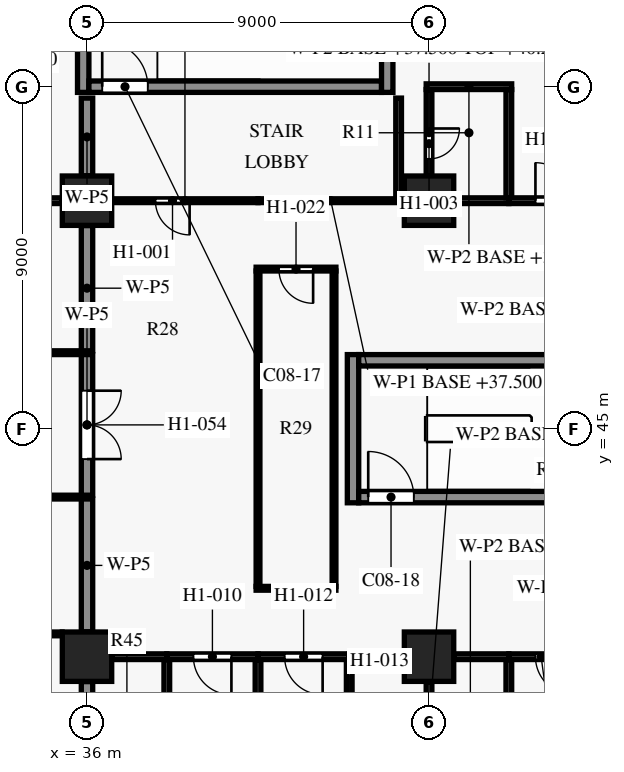
"""IFC4 building model, lengths in metres.
Left out: names, types, materials, properties, quantities, classifications, styles, units other than length and angle.
Written with IfcOpenShell. Run it as: python <this file> out.ifc"""

import sys

from ifc_helpers import new_model, si_unit, direction, frame, frame_2d, origin, origin_2d, place, context, subcontext, project, spatial, rectangle, extrude, element, fill, save


model = new_model("IFC4")
c1 = context("Model", 3, precision=1e-05, world=origin(), true_north=direction((0.0, 1.0)))
c2 = subcontext(c1, "Body", "Model", "MODEL_VIEW")
j1 = project(units=[si_unit("LENGTHUNIT", "METRE"), si_unit("PLANEANGLEUNIT", "RADIAN")], contexts=[c1])
p1 = place(None, origin())
s1 = spatial("IfcSite", under=j1, at=p1, CompositionType="ELEMENT")
p2 = place(p1, origin())
s2 = spatial("IfcBuilding", under=s1, at=p2, CompositionType="ELEMENT")
p3 = place(p2, frame((0.0, 0.0, 37.5)))
s3 = spatial("IfcBuildingStorey", under=s2, at=p3, CompositionType="ELEMENT", Elevation=37.5)
for number, where, z_axis, x_axis in (
    (1, (36.0, 39.0, 0.0), (0.0, 0.0, 1.0), (1.0, 0.0, 0.0)),
    (2, (36.0, 51.0, 0.0), (0.0, 0.0, 1.0), (1.0, 0.0, 0.0)),
    (3, (45.0, 39.0, 0.0), (0.0, 0.0, 1.0), (1.0, 0.0, 0.0)),
    (4, (45.0, 51.0, 0.0), (0.0, 0.0, 1.0), (1.0, 0.0, 0.0)),
):
    element("IfcColumn", number, at=place(p3, frame(where, z_axis=z_axis, x_axis=x_axis)), inside=s3, PredefinedType="COLUMN", context=c2, shape_type="SweptSolid", body=[
        extrude(rectangle(XDim=1.3, YDim=1.3, at=origin_2d()), origin(), (0.0, 0.0, 1.0), 3.6),
    ])
p4 = place(p3, frame((43.15, 43.2, 0.0), z_axis=(0.0, 0.0, 1.0), x_axis=(1.0, 0.0, 0.0)))
e5 = element("IfcWall", 5, at=p4, inside=s3, PredefinedType="SHEAR", context=c2, shape_type="SweptSolid", body=[
    extrude(rectangle(XDim=7.7, YDim=0.3, at=frame_2d((3.85, 0.0))), origin(), (0.0, 0.0, 1.0), 3.3),
])
p5 = place(p4, frame((0.25, 0.0, 0.0)))
e6 = element("IfcOpeningElement", 6, at=p5, cuts=e5, PredefinedType="OPENING", context=c2, shape_type="SweptSolid", body=[
    extrude(rectangle(XDim=1.2, YDim=2.2, at=frame_2d((0.6, 1.1))), frame((0.0, 0.16, 0.0), z_axis=(0.0, -1.0, 0.0), x_axis=(1.0, 0.0, 0.0)), (0.0, 0.0, 1.0), 0.32),
])
p6 = place(p3, frame((43.15, 46.8, 0.0), z_axis=(0.0, 0.0, 1.0), x_axis=(1.0, 0.0, 0.0)))
e7 = element("IfcWall", 7, at=p6, inside=s3, PredefinedType="SHEAR", context=c2, shape_type="SweptSolid", body=[
    extrude(rectangle(XDim=7.7, YDim=0.3, at=frame_2d((3.85, 0.0))), origin(), (0.0, 0.0, 1.0), 3.3),
])
p7 = place(p3, frame((36.05, 54.0, 0.0), z_axis=(0.0, 0.0, 1.0), x_axis=(1.0, 0.0, 0.0)))
e8 = element("IfcWall", 8, at=p7, inside=s3, PredefinedType="SHEAR", context=c2, shape_type="SweptSolid", body=[
    extrude(rectangle(XDim=7.7, YDim=0.3, at=frame_2d((3.85, 0.0))), origin(), (0.0, 0.0, 1.0), 3.3),
])
p8 = place(p7, frame((0.35, 0.0, 0.0)))
e9 = element("IfcOpeningElement", 9, at=p8, cuts=e8, PredefinedType="OPENING", context=c2, shape_type="SweptSolid", body=[
    extrude(rectangle(XDim=1.2, YDim=2.2, at=frame_2d((0.6, 1.1))), frame((0.0, 0.16, 0.0), z_axis=(0.0, -1.0, 0.0), x_axis=(1.0, 0.0, 0.0)), (0.0, 0.0, 1.0), 0.32),
])
for number, where, z_axis, x_axis in (
    (10, (35.9, 53.85, 0.0), (0.0, 0.0, 1.0), (0.0, 1.0, 0.0)),
    (11, (43.0, 43.05, 0.0), (0.0, 0.0, 1.0), (0.0, 1.0, 0.0)),
    (12, (43.9, 53.85, 0.0), (0.0, 0.0, 1.0), (0.0, 1.0, 0.0)),
):
    element("IfcWall", number, at=place(p3, frame(where, z_axis=z_axis, x_axis=x_axis)), inside=s3, PredefinedType="SHEAR", context=c2, shape_type="SweptSolid", body=[
        extrude(rectangle(XDim=3.9, YDim=0.3, at=frame_2d((1.95, 0.0))), origin(), (0.0, 0.0, 1.0), 3.3),
    ])
p9 = place(p3, frame((38.1, 36.075, 0.0), z_axis=(0.0, 0.0, 1.0), x_axis=(0.0, 1.0, 0.0)))
e13 = element("IfcWall", 13, at=p9, inside=s3, PredefinedType="PARTITIONING", context=c2, shape_type="SweptSolid", body=[
    extrude(rectangle(XDim=2.85, YDim=0.15, at=frame_2d((1.425, 0.0))), origin(), (0.0, 0.0, 1.0), 2.58),
])
p10 = place(p9, frame((1.025, 0.0, 0.0)))
e14 = element("IfcOpeningElement", 14, at=p10, cuts=e13, PredefinedType="OPENING", context=c2, shape_type="SweptSolid", body=[
    extrude(rectangle(XDim=0.8, YDim=2.1, at=frame_2d((0.4, 1.05))), frame((0.0, 0.085, 0.0), z_axis=(0.0, -1.0, 0.0), x_axis=(1.0, 0.0, 0.0)), (0.0, 0.0, 1.0), 0.17),
])
p11 = place(p3, frame((47.1, 36.075, 0.0), z_axis=(0.0, 0.0, 1.0), x_axis=(0.0, 1.0, 0.0)))
e15 = element("IfcWall", 15, at=p11, inside=s3, PredefinedType="PARTITIONING", context=c2, shape_type="SweptSolid", body=[
    extrude(rectangle(XDim=2.85, YDim=0.15, at=frame_2d((1.425, 0.0))), origin(), (0.0, 0.0, 1.0), 2.58),
])
p12 = place(p11, frame((1.025, 0.0, 0.0)))
e16 = element("IfcOpeningElement", 16, at=p12, cuts=e15, PredefinedType="OPENING", context=c2, shape_type="SweptSolid", body=[
    extrude(rectangle(XDim=0.8, YDim=2.1, at=frame_2d((0.4, 1.05))), frame((0.0, 0.085, 0.0), z_axis=(0.0, -1.0, 0.0), x_axis=(1.0, 0.0, 0.0)), (0.0, 0.0, 1.0), 0.17),
])
p13 = place(p3, frame((36.0, 38.345, 0.0), z_axis=(0.0, 0.0, 1.0), x_axis=(0.0, -1.0, 0.0)))
e17 = element("IfcWall", 17, at=p13, inside=s3, PredefinedType="PARTITIONING", context=c2, shape_type="SweptSolid", body=[
    extrude(rectangle(XDim=2.27, YDim=0.3, at=frame_2d((1.135, 0.0))), origin(), (0.0, 0.0, 1.0), 2.58),
])
p14 = place(p3, frame((45.0, 38.345, 0.0), z_axis=(0.0, 0.0, 1.0), x_axis=(0.0, -1.0, 0.0)))
e18 = element("IfcWall", 18, at=p14, inside=s3, PredefinedType="PARTITIONING", context=c2, shape_type="SweptSolid", body=[
    extrude(rectangle(XDim=2.27, YDim=0.15, at=frame_2d((1.135, 0.0))), origin(), (0.0, 0.0, 1.0), 2.73),
])
p15 = place(p3, frame((40.5, 38.925, 0.0), z_axis=(0.0, 0.0, 1.0), x_axis=(0.0, -1.0, 0.0)))
e19 = element("IfcWall", 19, at=p15, inside=s3, PredefinedType="PARTITIONING", context=c2, shape_type="SweptSolid", body=[
    extrude(rectangle(XDim=11.35, YDim=0.15, at=frame_2d((5.675, 0.0))), origin(), (0.0, 0.0, 1.0), 2.58),
])
p16 = place(p3, frame((42.9, 38.925, 0.0), z_axis=(0.0, 0.0, 1.0), x_axis=(0.0, -1.0, 0.0)))
e20 = element("IfcWall", 20, at=p16, inside=s3, PredefinedType="PARTITIONING", context=c2, shape_type="SweptSolid", body=[
    extrude(rectangle(XDim=2.85, YDim=0.15, at=frame_2d((1.425, 0.0))), origin(), (0.0, 0.0, 1.0), 2.58),
])
p17 = place(p16, frame((1.025, 0.0, 0.0)))
e21 = element("IfcOpeningElement", 21, at=p17, cuts=e20, PredefinedType="OPENING", context=c2, shape_type="SweptSolid", body=[
    extrude(rectangle(XDim=0.8, YDim=2.1, at=frame_2d((0.4, 1.05))), frame((0.0, 0.085, 0.0), z_axis=(0.0, -1.0, 0.0), x_axis=(1.0, 0.0, 0.0)), (0.0, 0.0, 1.0), 0.17),
])
p18 = place(p3, frame((38.1, 39.0, 0.0), z_axis=(0.0, 0.0, 1.0), x_axis=(-1.0, 0.0, 0.0)))
e22 = element("IfcWall", 22, at=p18, inside=s3, PredefinedType="PARTITIONING", context=c2, shape_type="SweptSolid", body=[
    extrude(rectangle(XDim=1.445, YDim=0.15, at=frame_2d((0.723, 0.0))), origin(), (0.0, 0.0, 1.0), 2.58),
])
p19 = place(p3, frame((40.5, 39.0, 0.0), z_axis=(0.0, 0.0, 1.0), x_axis=(-1.0, 0.0, 0.0)))
e23 = element("IfcWall", 23, at=p19, inside=s3, PredefinedType="PARTITIONING", context=c2, shape_type="SweptSolid", body=[
    extrude(rectangle(XDim=2.4, YDim=0.15, at=frame_2d((1.2, 0.0))), origin(), (0.0, 0.0, 1.0), 2.58),
])
p20 = place(p19, frame((0.7, 0.0, 0.0)))
e24 = element("IfcOpeningElement", 24, at=p20, cuts=e23, PredefinedType="OPENING", context=c2, shape_type="SweptSolid", body=[
    extrude(rectangle(XDim=1.0, YDim=2.1, at=frame_2d((0.5, 1.05))), frame((0.0, 0.085, 0.0), z_axis=(0.0, -1.0, 0.0), x_axis=(1.0, 0.0, 0.0)), (0.0, 0.0, 1.0), 0.17),
])
p21 = place(p3, frame((42.9, 39.0, 0.0), z_axis=(0.0, 0.0, 1.0), x_axis=(-1.0, 0.0, 0.0)))
e25 = element("IfcWall", 25, at=p21, inside=s3, PredefinedType="PARTITIONING", context=c2, shape_type="SweptSolid", body=[
    extrude(rectangle(XDim=2.4, YDim=0.15, at=frame_2d((1.2, 0.0))), origin(), (0.0, 0.0, 1.0), 2.58),
])
p22 = place(p21, frame((0.7, 0.0, 0.0)))
e26 = element("IfcOpeningElement", 26, at=p22, cuts=e25, PredefinedType="OPENING", context=c2, shape_type="SweptSolid", body=[
    extrude(rectangle(XDim=1.0, YDim=2.1, at=frame_2d((0.5, 1.05))), frame((0.0, 0.085, 0.0), z_axis=(0.0, -1.0, 0.0), x_axis=(1.0, 0.0, 0.0)), (0.0, 0.0, 1.0), 0.17),
])
for number, where, z_axis, x_axis in (
    (27, (44.345, 39.0, 0.0), (0.0, 0.0, 1.0), (-1.0, 0.0, 0.0)),
    (28, (47.1, 39.0, 0.0), (0.0, 0.0, 1.0), (-1.0, 0.0, 0.0)),
):
    element("IfcWall", number, at=place(p3, frame(where, z_axis=z_axis, x_axis=x_axis)), inside=s3, PredefinedType="PARTITIONING", context=c2, shape_type="SweptSolid", body=[
        extrude(rectangle(XDim=1.445, YDim=0.15, at=frame_2d((0.723, 0.0))), origin(), (0.0, 0.0, 1.0), 2.58),
    ])
p23 = place(p3, frame((49.5, 39.0, 0.0), z_axis=(0.0, 0.0, 1.0), x_axis=(-1.0, 0.0, 0.0)))
e29 = element("IfcWall", 29, at=p23, inside=s3, PredefinedType="PARTITIONING", context=c2, shape_type="SweptSolid", body=[
    extrude(rectangle(XDim=2.4, YDim=0.15, at=frame_2d((1.2, 0.0))), origin(), (0.0, 0.0, 1.0), 2.58),
])
p24 = place(p23, frame((0.7, 0.0, 0.0)))
e30 = element("IfcOpeningElement", 30, at=p24, cuts=e29, PredefinedType="OPENING", context=c2, shape_type="SweptSolid", body=[
    extrude(rectangle(XDim=1.0, YDim=2.1, at=frame_2d((0.5, 1.05))), frame((0.0, 0.085, 0.0), z_axis=(0.0, -1.0, 0.0), x_axis=(1.0, 0.0, 0.0)), (0.0, 0.0, 1.0), 0.17),
])
p25 = place(p3, frame((35.345, 39.6, 0.0), z_axis=(0.0, 0.0, 1.0), x_axis=(-1.0, 0.0, 0.0)))
e31 = element("IfcWall", 31, at=p25, inside=s3, PredefinedType="PARTITIONING", context=c2, shape_type="SweptSolid", body=[
    extrude(rectangle(XDim=5.895, YDim=0.1, at=frame_2d((2.948, 0.0))), origin(), (0.0, 0.0, 1.0), 3.28),
])
p26 = place(p3, frame((40.45, 40.8, 0.0), z_axis=(0.0, 0.0, 1.0), x_axis=(1.0, 0.0, 0.0)))
e32 = element("IfcWall", 32, at=p26, inside=s3, PredefinedType="PARTITIONING", context=c2, shape_type="SweptSolid", body=[
    extrude(rectangle(XDim=2.1, YDim=0.1, at=frame_2d((1.05, 0.0))), origin(), (0.0, 0.0, 1.0), 3.28),
])
p27 = place(p3, frame((36.0, 43.15, 0.0), z_axis=(0.0, 0.0, 1.0), x_axis=(0.0, -1.0, 0.0)))
e33 = element("IfcWall", 33, at=p27, inside=s3, PredefinedType="PARTITIONING", context=c2, shape_type="SweptSolid", body=[
    extrude(rectangle(XDim=3.495, YDim=0.3, at=frame_2d((1.748, 0.0))), origin(), (0.0, 0.0, 1.0), 2.58),
])
p28 = place(p3, frame((35.85, 43.2, 0.0), z_axis=(0.0, 0.0, 1.0), x_axis=(-1.0, 0.0, 0.0)))
e34 = element("IfcWall", 34, at=p28, inside=s3, PredefinedType="PARTITIONING", context=c2, shape_type="SweptSolid", body=[
    extrude(rectangle(XDim=6.5, YDim=0.1, at=frame_2d((3.25, 0.0))), origin(), (0.0, 0.0, 1.0), 3.28),
])
p29 = place(p28, frame((2.7, 0.0, 0.0)))
e35 = element("IfcOpeningElement", 35, at=p29, cuts=e34, PredefinedType="OPENING", context=c2, shape_type="SweptSolid", body=[
    extrude(rectangle(XDim=0.9, YDim=2.1, at=frame_2d((0.45, 1.05))), frame((0.0, 0.06, 0.0), z_axis=(0.0, -1.0, 0.0), x_axis=(1.0, 0.0, 0.0)), (0.0, 0.0, 1.0), 0.12),
])
p30 = place(p3, frame((36.0, 46.95, 0.0), z_axis=(0.0, 0.0, 1.0), x_axis=(0.0, -1.0, 0.0)))
e36 = element("IfcWall", 36, at=p30, inside=s3, PredefinedType="PARTITIONING", context=c2, shape_type="SweptSolid", body=[
    extrude(rectangle(XDim=3.7, YDim=0.3, at=frame_2d((1.85, 0.0))), origin(), (0.0, 0.0, 1.0), 2.58),
])
p31 = place(p30, frame((0.95, 0.0, 0.0)))
e37 = element("IfcOpeningElement", 37, at=p31, cuts=e36, PredefinedType="OPENING", context=c2, shape_type="SweptSolid", body=[
    extrude(rectangle(XDim=1.8, YDim=2.1, at=frame_2d((0.9, 1.05))), frame((0.0, 0.16, 0.0), z_axis=(0.0, -1.0, 0.0), x_axis=(1.0, 0.0, 0.0)), (0.0, 0.0, 1.0), 0.32),
])
p32 = place(p3, frame((31.5, 47.0, 0.0), z_axis=(0.0, 0.0, 1.0), x_axis=(1.0, 0.0, 0.0)))
e38 = element("IfcWall", 38, at=p32, inside=s3, PredefinedType="PARTITIONING", context=c2, shape_type="SweptSolid", body=[
    extrude(rectangle(XDim=4.35, YDim=0.1, at=frame_2d((2.175, 0.0))), origin(), (0.0, 0.0, 1.0), 3.28),
])
for number, where, z_axis, x_axis in (
    (39, (40.5, 49.15, 0.0), (0.0, 0.0, 1.0), (0.0, -1.0, 0.0)),
    (40, (42.5, 49.15, 0.0), (0.0, 0.0, 1.0), (0.0, -1.0, 0.0)),
):
    element("IfcWall", number, at=place(p3, frame(where, z_axis=z_axis, x_axis=x_axis)), inside=s3, PredefinedType="PARTITIONING", context=c2, shape_type="SweptSolid", body=[
        extrude(rectangle(XDim=8.3, YDim=0.1, at=frame_2d((4.15, 0.0))), origin(), (0.0, 0.0, 1.0), 3.28),
    ])
p33 = place(p3, frame((42.55, 49.2, 0.0), z_axis=(0.0, 0.0, 1.0), x_axis=(-1.0, 0.0, 0.0)))
e41 = element("IfcWall", 41, at=p33, inside=s3, PredefinedType="PARTITIONING", context=c2, shape_type="SweptSolid", body=[
    extrude(rectangle(XDim=2.1, YDim=0.1, at=frame_2d((1.05, 0.0))), origin(), (0.0, 0.0, 1.0), 3.28),
])
p34 = place(p33, frame((0.6, 0.0, 0.0)))
e42 = element("IfcOpeningElement", 42, at=p34, cuts=e41, PredefinedType="OPENING", context=c2, shape_type="SweptSolid", body=[
    extrude(rectangle(XDim=0.9, YDim=2.1, at=frame_2d((0.45, 1.05))), frame((0.0, 0.06, 0.0), z_axis=(0.0, -1.0, 0.0), x_axis=(1.0, 0.0, 0.0)), (0.0, 0.0, 1.0), 0.12),
])
p35 = place(p3, frame((36.0, 50.345, 0.0), z_axis=(0.0, 0.0, 1.0), x_axis=(0.0, -1.0, 0.0)))
e43 = element("IfcWall", 43, at=p35, inside=s3, PredefinedType="PARTITIONING", context=c2, shape_type="SweptSolid", body=[
    extrude(rectangle(XDim=3.295, YDim=0.3, at=frame_2d((1.647, 0.0))), origin(), (0.0, 0.0, 1.0), 2.58),
])
p36 = place(p3, frame((33.6, 51.0, 0.0), z_axis=(0.0, 0.0, 1.0), x_axis=(1.0, 0.0, 0.0)))
e44 = element("IfcWall", 44, at=p36, inside=s3, PredefinedType="PARTITIONING", context=c2, shape_type="SweptSolid", body=[
    extrude(rectangle(XDim=1.745, YDim=0.15, at=frame_2d((0.873, 0.0))), origin(), (0.0, 0.0, 1.0), 3.28),
])
p37 = place(p3, frame((40.5, 51.0, 0.0), z_axis=(0.0, 0.0, 1.0), x_axis=(-1.0, 0.0, 0.0)))
e45 = element("IfcWall", 45, at=p37, inside=s3, PredefinedType="PARTITIONING", context=c2, shape_type="SweptSolid", body=[
    extrude(rectangle(XDim=3.845, YDim=0.1, at=frame_2d((1.922, 0.0))), origin(), (0.0, 0.0, 1.0), 2.58),
])
p38 = place(p37, frame((1.8, 0.0, 0.0)))
e46 = element("IfcOpeningElement", 46, at=p38, cuts=e45, PredefinedType="OPENING", context=c2, shape_type="SweptSolid", body=[
    extrude(rectangle(XDim=0.9, YDim=2.1, at=frame_2d((0.45, 1.05))), frame((0.0, 0.06, 0.0), z_axis=(0.0, -1.0, 0.0), x_axis=(1.0, 0.0, 0.0)), (0.0, 0.0, 1.0), 0.12),
])
p39 = place(p3, frame((44.33, 51.0, 0.0), z_axis=(0.0, 0.0, 1.0), x_axis=(-1.0, 0.0, 0.0)))
e47 = element("IfcWall", 47, at=p39, inside=s3, PredefinedType="PARTITIONING", context=c2, shape_type="SweptSolid", body=[
    extrude(rectangle(XDim=3.83, YDim=0.1, at=frame_2d((1.915, 0.0))), origin(), (0.0, 0.0, 1.0), 2.58),
])
p40 = place(p3, frame((45.655, 51.0, 0.0), z_axis=(0.0, 0.0, 1.0), x_axis=(1.0, 0.0, 0.0)))
e48 = element("IfcWall", 48, at=p40, inside=s3, PredefinedType="PARTITIONING", context=c2, shape_type="SweptSolid", body=[
    extrude(rectangle(XDim=1.445, YDim=0.15, at=frame_2d((0.723, 0.0))), origin(), (0.0, 0.0, 1.0), 2.58),
])
p41 = place(p3, frame((47.1, 51.0, 0.0), z_axis=(0.0, 0.0, 1.0), x_axis=(1.0, 0.0, 0.0)))
e49 = element("IfcWall", 49, at=p41, inside=s3, PredefinedType="PARTITIONING", context=c2, shape_type="SweptSolid", body=[
    extrude(rectangle(XDim=2.4, YDim=0.15, at=frame_2d((1.2, 0.0))), origin(), (0.0, 0.0, 1.0), 2.58),
])
p42 = place(p41, frame((0.7, 0.0, 0.0)))
e50 = element("IfcOpeningElement", 50, at=p42, cuts=e49, PredefinedType="OPENING", context=c2, shape_type="SweptSolid", body=[
    extrude(rectangle(XDim=1.0, YDim=2.1, at=frame_2d((0.5, 1.05))), frame((0.0, 0.085, 0.0), z_axis=(0.0, -1.0, 0.0), x_axis=(1.0, 0.0, 0.0)), (0.0, 0.0, 1.0), 0.17),
])
p43 = place(p3, frame((47.1, 51.075, 0.0), z_axis=(0.0, 0.0, 1.0), x_axis=(0.0, 1.0, 0.0)))
e51 = element("IfcWall", 51, at=p43, inside=s3, PredefinedType="PARTITIONING", context=c2, shape_type="SweptSolid", body=[
    extrude(rectangle(XDim=2.85, YDim=0.15, at=frame_2d((1.425, 0.0))), origin(), (0.0, 0.0, 1.0), 2.58),
])
p44 = place(p3, frame((36.0, 53.7, 0.0), z_axis=(0.0, 0.0, 1.0), x_axis=(0.0, -1.0, 0.0)))
e52 = element("IfcWall", 52, at=p44, inside=s3, PredefinedType="PARTITIONING", context=c2, shape_type="SweptSolid", body=[
    extrude(rectangle(XDim=2.045, YDim=0.3, at=frame_2d((1.022, 0.0))), origin(), (0.0, 0.0, 1.0), 2.58),
])
p45 = place(p3, frame((44.2, 53.7, 0.0), z_axis=(0.0, 0.0, 1.0), x_axis=(0.0, -1.0, 0.0)))
e53 = element("IfcWall", 53, at=p45, inside=s3, PredefinedType="PARTITIONING", context=c2, shape_type="SweptSolid", body=[
    extrude(rectangle(XDim=2.625, YDim=0.15, at=frame_2d((1.312, 0.0))), origin(), (0.0, 0.0, 1.0), 2.58),
])
p46 = place(p3, frame((45.0, 53.925, 0.0), z_axis=(0.0, 0.0, 1.0), x_axis=(0.0, -1.0, 0.0)))
e54 = element("IfcWall", 54, at=p46, inside=s3, PredefinedType="PARTITIONING", context=c2, shape_type="SweptSolid", body=[
    extrude(rectangle(XDim=2.27, YDim=0.15, at=frame_2d((1.135, 0.0))), origin(), (0.0, 0.0, 1.0), 2.73),
])
p47 = place(p46, frame((1.025, 0.0, 0.0)))
e55 = element("IfcOpeningElement", 55, at=p47, cuts=e54, PredefinedType="OPENING", context=c2, shape_type="SweptSolid", body=[
    extrude(rectangle(XDim=0.8, YDim=2.1, at=frame_2d((0.4, 1.05))), frame((0.0, 0.085, 0.0), z_axis=(0.0, -1.0, 0.0), x_axis=(1.0, 0.0, 0.0)), (0.0, 0.0, 1.0), 0.17),
])
p48 = place(p3, frame((47.175, 54.0, 0.0), z_axis=(0.0, 0.0, 1.0), x_axis=(-1.0, 0.0, 0.0)))
e56 = element("IfcWall", 56, at=p48, inside=s3, PredefinedType="PARTITIONING", context=c2, shape_type="SweptSolid", body=[
    extrude(rectangle(XDim=2.25, YDim=0.15, at=frame_2d((1.125, 0.0))), origin(), (0.0, 0.0, 1.0), 2.73),
])
p49 = place(p8, origin())
e57 = element("IfcDoor", 57, at=p49, inside=s3, OperationType="SINGLE_SWING_LEFT", PredefinedType="DOOR", context=c2, shape_type="SweptSolid", body=[
    extrude(rectangle(XDim=1.2, YDim=2.2, at=frame_2d((0.6, 1.1))), frame((0.0, 0.025, 0.0), z_axis=(0.0, -1.0, 0.0), x_axis=(1.0, 0.0, 0.0)), (0.0, 0.0, 1.0), 0.05),
])
fill(e9, e57)
p50 = place(p5, origin())
e58 = element("IfcDoor", 58, at=p50, inside=s3, OperationType="SINGLE_SWING_RIGHT", PredefinedType="DOOR", context=c2, shape_type="SweptSolid", body=[
    extrude(rectangle(XDim=1.2, YDim=2.2, at=frame_2d((0.6, 1.1))), frame((0.0, 0.025, 0.0), z_axis=(0.0, -1.0, 0.0), x_axis=(1.0, 0.0, 0.0)), (0.0, 0.0, 1.0), 0.05),
])
fill(e6, e58)
p51 = place(p38, origin())
e59 = element("IfcDoor", 59, at=p51, inside=s3, OperationType="SINGLE_SWING_LEFT", PredefinedType="DOOR", context=c2, shape_type="SweptSolid", body=[
    extrude(rectangle(XDim=0.9, YDim=2.1, at=frame_2d((0.45, 1.05))), frame((0.0, 0.025, 0.0), z_axis=(0.0, -1.0, 0.0), x_axis=(1.0, 0.0, 0.0)), (0.0, 0.0, 1.0), 0.05),
])
fill(e46, e59)
p52 = place(p42, origin())
e60 = element("IfcDoor", 60, at=p52, inside=s3, OperationType="SINGLE_SWING_LEFT", PredefinedType="DOOR", context=c2, shape_type="SweptSolid", body=[
    extrude(rectangle(XDim=1.0, YDim=2.1, at=frame_2d((0.5, 1.05))), frame((0.0, 0.025, 0.0), z_axis=(0.0, -1.0, 0.0), x_axis=(1.0, 0.0, 0.0)), (0.0, 0.0, 1.0), 0.05),
])
fill(e50, e60)
p53 = place(p47, origin())
e61 = element("IfcDoor", 61, at=p53, inside=s3, OperationType="SINGLE_SWING_RIGHT", PredefinedType="DOOR", context=c2, shape_type="SweptSolid", body=[
    extrude(rectangle(XDim=0.8, YDim=2.1, at=frame_2d((0.4, 1.05))), frame((0.0, 0.025, 0.0), z_axis=(0.0, -1.0, 0.0), x_axis=(1.0, 0.0, 0.0)), (0.0, 0.0, 1.0), 0.05),
])
fill(e55, e61)
p54 = place(p20, origin())
e62 = element("IfcDoor", 62, at=p54, inside=s3, OperationType="SINGLE_SWING_LEFT", PredefinedType="DOOR", context=c2, shape_type="SweptSolid", body=[
    extrude(rectangle(XDim=1.0, YDim=2.1, at=frame_2d((0.5, 1.05))), frame((0.0, 0.025, 0.0), z_axis=(0.0, -1.0, 0.0), x_axis=(1.0, 0.0, 0.0)), (0.0, 0.0, 1.0), 0.05),
])
fill(e24, e62)
p55 = place(p22, origin())
e63 = element("IfcDoor", 63, at=p55, inside=s3, OperationType="SINGLE_SWING_LEFT", PredefinedType="DOOR", context=c2, shape_type="SweptSolid", body=[
    extrude(rectangle(XDim=1.0, YDim=2.1, at=frame_2d((0.5, 1.05))), frame((0.0, 0.025, 0.0), z_axis=(0.0, -1.0, 0.0), x_axis=(1.0, 0.0, 0.0)), (0.0, 0.0, 1.0), 0.05),
])
fill(e26, e63)
p56 = place(p24, origin())
e64 = element("IfcDoor", 64, at=p56, inside=s3, OperationType="SINGLE_SWING_LEFT", PredefinedType="DOOR", context=c2, shape_type="SweptSolid", body=[
    extrude(rectangle(XDim=1.0, YDim=2.1, at=frame_2d((0.5, 1.05))), frame((0.0, 0.025, 0.0), z_axis=(0.0, -1.0, 0.0), x_axis=(1.0, 0.0, 0.0)), (0.0, 0.0, 1.0), 0.05),
])
fill(e30, e64)
p57 = place(p34, origin())
e65 = element("IfcDoor", 65, at=p57, inside=s3, OperationType="SINGLE_SWING_LEFT", PredefinedType="DOOR", context=c2, shape_type="SweptSolid", body=[
    extrude(rectangle(XDim=0.9, YDim=2.1, at=frame_2d((0.45, 1.05))), frame((0.0, 0.025, 0.0), z_axis=(0.0, -1.0, 0.0), x_axis=(1.0, 0.0, 0.0)), (0.0, 0.0, 1.0), 0.05),
])
fill(e42, e65)
p58 = place(p31, origin())
e66 = element("IfcDoor", 66, at=p58, inside=s3, OperationType="DOUBLE_DOOR_SINGLE_SWING", PredefinedType="DOOR", context=c2, shape_type="SweptSolid", body=[
    extrude(rectangle(XDim=1.8, YDim=2.1, at=frame_2d((0.9, 1.05))), frame((0.0, 0.025, 0.0), z_axis=(0.0, -1.0, 0.0), x_axis=(1.0, 0.0, 0.0)), (0.0, 0.0, 1.0), 0.05),
])
fill(e37, e66)
save(model, sys.argv[1])
